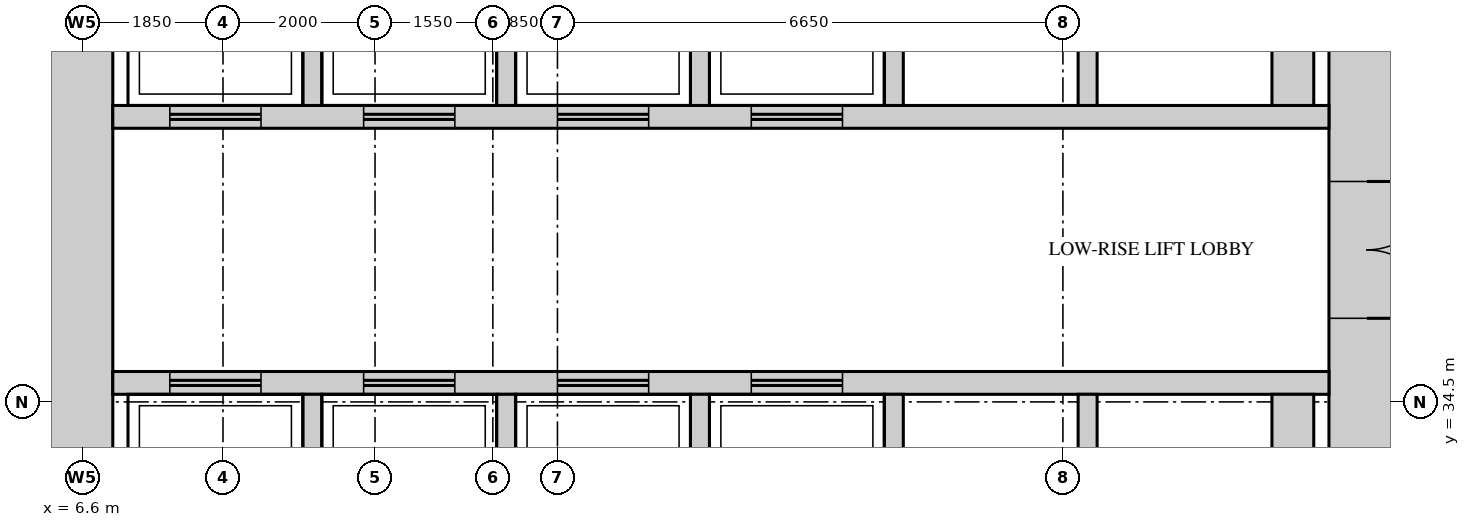
"""IFC4 building model, lengths in metres.
Left out: names, types, materials, properties, quantities, classifications, styles, units other than length and angle.
Written with IfcOpenShell. Run it as: python <this file> out.ifc"""

import sys

from ifc_helpers import new_model, si_unit, direction, frame, frame_2d, origin, place, context, subcontext, project, spatial, rectangle, extrude, source, transform, mapped, element, fill, save


model = new_model("IFC4")
c1 = context("Model", 3, precision=1e-05, world=origin(), true_north=direction((0.0, 1.0)))
c2 = subcontext(c1, "Body", "Model", "MODEL_VIEW")
j1 = project(units=[si_unit("LENGTHUNIT", "METRE"), si_unit("PLANEANGLEUNIT", "RADIAN")], contexts=[c1])
p1 = place(None, origin())
s1 = spatial("IfcSite", under=j1, at=p1, CompositionType="ELEMENT")
p2 = place(p1, origin())
s2 = spatial("IfcBuilding", under=s1, at=p2, CompositionType="ELEMENT")
p3 = place(p2, frame((0.0, 0.0, 136.7)))
s3 = spatial("IfcBuildingStorey", under=s2, at=p3, CompositionType="ELEMENT", Elevation=136.7)
m1 = source(origin(), c2, "Body", "SweptSolid", [
    extrude(rectangle(XDim=28.0, YDim=1.0, at=frame_2d((14.0, 0.0))), origin(), (0.0, 0.0, 1.0), 4.1),
])
p4 = place(p3, frame((23.5, 13.0, 0.0), z_axis=(0.0, 0.0, 1.0), x_axis=(0.0, 1.0, 0.0)))
e1 = element("IfcWall", 1, at=p4, inside=s3, PredefinedType="SHEAR", context=c2, shape_type="MappedRepresentation", body=[
    mapped(m1, transform((0.0, 0.0, 0.0))),
])
m2 = source(origin(), c2, "Body", "SweptSolid", [
    extrude(rectangle(XDim=1.8, YDim=2.1, at=frame_2d((0.9, 1.05))), frame((0.0, 0.51, 0.0), z_axis=(0.0, -1.0, 0.0), x_axis=(1.0, 0.0, 0.0)), (0.0, 0.0, 1.0), 1.02),
])
p5 = place(p4, frame((22.6, 0.0, 0.0)))
e2 = element("IfcOpeningElement", 2, at=p5, cuts=e1, PredefinedType="OPENING", context=c2, shape_type="MappedRepresentation", body=[
    mapped(m2, transform((0.0, 0.0, 0.0))),
])
m3 = source(origin(), c2, "Body", "SweptSolid", [
    extrude(rectangle(XDim=1.2, YDim=2.1, at=frame_2d((0.6, 1.05))), frame((0.0, 0.51, 0.0), z_axis=(0.0, -1.0, 0.0), x_axis=(1.0, 0.0, 0.0)), (0.0, 0.0, 1.0), 1.02),
])
p6 = place(p4, frame((15.35, 0.0, 0.0)))
e3 = element("IfcOpeningElement", 3, at=p6, cuts=e1, PredefinedType="OPENING", context=c2, shape_type="MappedRepresentation", body=[
    mapped(m3, transform((0.0, 0.0, 0.0))),
])
m4 = source(origin(), c2, "Body", "SweptSolid", [
    extrude(rectangle(XDim=0.9, YDim=2.1, at=frame_2d((0.45, 1.05))), frame((0.0, 0.51, 0.0), z_axis=(0.0, -1.0, 0.0), x_axis=(1.0, 0.0, 0.0)), (0.0, 0.0, 1.0), 1.02),
])
p7 = place(p4, frame((1.35, 0.0, 0.0)))
e4 = element("IfcOpeningElement", 4, at=p7, cuts=e1, PredefinedType="OPENING", context=c2, shape_type="MappedRepresentation", body=[
    mapped(m4, transform((0.0, 0.0, 0.0))),
])
p8 = place(p4, frame((4.55, 0.0, 0.0)))
e5 = element("IfcOpeningElement", 5, at=p8, cuts=e1, PredefinedType="OPENING", context=c2, shape_type="MappedRepresentation", body=[
    mapped(m4, transform((0.0, 0.0, 0.0))),
])
p9 = place(p4, frame((7.8, 0.0, 0.0)))
e6 = element("IfcOpeningElement", 6, at=p9, cuts=e1, PredefinedType="OPENING", context=c2, shape_type="MappedRepresentation", body=[
    mapped(m4, transform((0.0, 0.0, 0.0))),
])
p10 = place(p3, frame((6.5, 13.0, 0.0), z_axis=(0.0, 0.0, 1.0), x_axis=(0.0, 1.0, 0.0)))
e7 = element("IfcWall", 7, at=p10, inside=s3, PredefinedType="SHEAR", context=c2, shape_type="MappedRepresentation", body=[
    mapped(m1, transform((0.0, 0.0, 0.0))),
])
m5 = source(origin(), c2, "Body", "SweptSolid", [
    extrude(rectangle(XDim=16.0, YDim=0.3, at=frame_2d((8.0, 0.0))), origin(), (0.0, 0.0, 1.0), 4.1),
])
p11 = place(p3, frame((7.0, 38.25, 0.0), z_axis=(0.0, 0.0, 1.0), x_axis=(1.0, 0.0, 0.0)))
e8 = element("IfcWall", 8, at=p11, inside=s3, PredefinedType="STANDARD", context=c2, shape_type="MappedRepresentation", body=[
    mapped(m5, transform((0.0, 0.0, 0.0))),
])
m6 = source(origin(), c2, "Body", "SweptSolid", [
    extrude(rectangle(XDim=1.2, YDim=2.1, at=frame_2d((0.6, 1.05))), frame((0.0, 0.16, 0.0), z_axis=(0.0, -1.0, 0.0), x_axis=(1.0, 0.0, 0.0)), (0.0, 0.0, 1.0), 0.32),
])
p12 = place(p11, frame((0.75, 0.0, 0.0)))
e9 = element("IfcOpeningElement", 9, at=p12, cuts=e8, PredefinedType="OPENING", context=c2, shape_type="MappedRepresentation", body=[
    mapped(m6, transform((0.0, 0.0, 0.0))),
])
p13 = place(p11, frame((3.3, 0.0, 0.0)))
e10 = element("IfcOpeningElement", 10, at=p13, cuts=e8, PredefinedType="OPENING", context=c2, shape_type="MappedRepresentation", body=[
    mapped(m6, transform((0.0, 0.0, 0.0))),
])
p14 = place(p11, frame((5.85, 0.0, 0.0)))
e11 = element("IfcOpeningElement", 11, at=p14, cuts=e8, PredefinedType="OPENING", context=c2, shape_type="MappedRepresentation", body=[
    mapped(m6, transform((0.0, 0.0, 0.0))),
])
p15 = place(p11, frame((8.4, 0.0, 0.0)))
e12 = element("IfcOpeningElement", 12, at=p15, cuts=e8, PredefinedType="OPENING", context=c2, shape_type="MappedRepresentation", body=[
    mapped(m6, transform((0.0, 0.0, 0.0))),
])
p16 = place(p3, frame((7.0, 34.75, 0.0), z_axis=(0.0, 0.0, 1.0), x_axis=(1.0, 0.0, 0.0)))
e13 = element("IfcWall", 13, at=p16, inside=s3, PredefinedType="STANDARD", context=c2, shape_type="MappedRepresentation", body=[
    mapped(m5, transform((0.0, 0.0, 0.0))),
])
p17 = place(p16, frame((0.75, 0.0, 0.0)))
e14 = element("IfcOpeningElement", 14, at=p17, cuts=e13, PredefinedType="OPENING", context=c2, shape_type="MappedRepresentation", body=[
    mapped(m6, transform((0.0, 0.0, 0.0))),
])
p18 = place(p16, frame((3.3, 0.0, 0.0)))
e15 = element("IfcOpeningElement", 15, at=p18, cuts=e13, PredefinedType="OPENING", context=c2, shape_type="MappedRepresentation", body=[
    mapped(m6, transform((0.0, 0.0, 0.0))),
])
p19 = place(p16, frame((5.85, 0.0, 0.0)))
e16 = element("IfcOpeningElement", 16, at=p19, cuts=e13, PredefinedType="OPENING", context=c2, shape_type="MappedRepresentation", body=[
    mapped(m6, transform((0.0, 0.0, 0.0))),
])
p20 = place(p16, frame((8.4, 0.0, 0.0)))
e17 = element("IfcOpeningElement", 17, at=p20, cuts=e13, PredefinedType="OPENING", context=c2, shape_type="MappedRepresentation", body=[
    mapped(m6, transform((0.0, 0.0, 0.0))),
])
m7 = source(origin(), c2, "Body", "SweptSolid", [
    extrude(rectangle(XDim=2.6, YDim=0.25, at=frame_2d((1.3, 0.0))), origin(), (0.0, 0.0, 1.0), 4.1),
])
for number, where, z_axis, x_axis in (
    (18, (9.625, 38.4, 0.0), (0.0, 0.0, 1.0), (0.0, 1.0, 0.0)),
    (19, (12.175, 38.4, 0.0), (0.0, 0.0, 1.0), (0.0, 1.0, 0.0)),
    (20, (14.725, 38.4, 0.0), (0.0, 0.0, 1.0), (0.0, 1.0, 0.0)),
    (21, (17.275, 38.4, 0.0), (0.0, 0.0, 1.0), (0.0, 1.0, 0.0)),
    (22, (19.825, 38.4, 0.0), (0.0, 0.0, 1.0), (0.0, 1.0, 0.0)),
):
    element("IfcWall", number, at=place(p3, frame(where, z_axis=z_axis, x_axis=x_axis)), inside=s3, PredefinedType="STANDARD", context=c2, shape_type="MappedRepresentation", body=[
        mapped(m7, transform((0.0, 0.0, 0.0))),
    ])
m8 = source(origin(), c2, "Body", "SweptSolid", [
    extrude(rectangle(XDim=2.6, YDim=0.55, at=frame_2d((1.3, 0.0))), origin(), (0.0, 0.0, 1.0), 4.1),
])
p21 = place(p3, frame((22.525, 38.4, 0.0), z_axis=(0.0, 0.0, 1.0), x_axis=(0.0, 1.0, 0.0)))
e23 = element("IfcWall", 23, at=p21, inside=s3, PredefinedType="STANDARD", context=c2, shape_type="MappedRepresentation", body=[
    mapped(m8, transform((0.0, 0.0, 0.0))),
])
m9 = source(origin(), c2, "Body", "SweptSolid", [
    extrude(rectangle(XDim=2.4, YDim=0.25, at=frame_2d((1.2, 0.0))), origin(), (0.0, 0.0, 1.0), 4.1),
])
for number, where, z_axis, x_axis in (
    (24, (9.625, 32.2, 0.0), (0.0, 0.0, 1.0), (0.0, 1.0, 0.0)),
    (25, (12.175, 32.2, 0.0), (0.0, 0.0, 1.0), (0.0, 1.0, 0.0)),
    (26, (14.725, 32.2, 0.0), (0.0, 0.0, 1.0), (0.0, 1.0, 0.0)),
    (27, (17.275, 32.2, 0.0), (0.0, 0.0, 1.0), (0.0, 1.0, 0.0)),
    (28, (19.825, 32.2, 0.0), (0.0, 0.0, 1.0), (0.0, 1.0, 0.0)),
):
    element("IfcWall", number, at=place(p3, frame(where, z_axis=z_axis, x_axis=x_axis)), inside=s3, PredefinedType="STANDARD", context=c2, shape_type="MappedRepresentation", body=[
        mapped(m9, transform((0.0, 0.0, 0.0))),
    ])
m10 = source(origin(), c2, "Body", "SweptSolid", [
    extrude(rectangle(XDim=2.4, YDim=0.55, at=frame_2d((1.2, 0.0))), origin(), (0.0, 0.0, 1.0), 4.1),
])
p22 = place(p3, frame((22.525, 32.2, 0.0), z_axis=(0.0, 0.0, 1.0), x_axis=(0.0, 1.0, 0.0)))
e29 = element("IfcWall", 29, at=p22, inside=s3, PredefinedType="STANDARD", context=c2, shape_type="MappedRepresentation", body=[
    mapped(m10, transform((0.0, 0.0, 0.0))),
])
m11 = source(origin(), c2, "Body", "SweptSolid", [
    extrude(rectangle(XDim=1.8, YDim=2.1, at=frame_2d((0.9, 1.05))), frame((0.0, 0.45, 0.0), z_axis=(0.0, -1.0, 0.0), x_axis=(1.0, 0.0, 0.0)), (0.0, 0.0, 1.0), 0.9),
])
p23 = place(p5, origin())
e30 = element("IfcDoor", 30, at=p23, inside=s3, OperationType="DOUBLE_DOOR_SINGLE_SWING", PredefinedType="DOOR", context=c2, shape_type="MappedRepresentation", body=[
    mapped(m11, transform((0.0, 0.0, 0.0))),
])
fill(e2, e30)
m12 = source(origin(), c2, "Body", "SweptSolid", [
    extrude(rectangle(XDim=1.2, YDim=2.1, at=frame_2d((0.6, 1.05))), frame((0.0, 0.025, 0.0), z_axis=(0.0, -1.0, 0.0), x_axis=(1.0, 0.0, 0.0)), (0.0, 0.0, 1.0), 0.05),
])
p24 = place(p17, origin())
e31 = element("IfcDoor", 31, at=p24, inside=s3, OperationType="DOUBLE_DOOR_SLIDING", PredefinedType="DOOR", context=c2, shape_type="MappedRepresentation", body=[
    mapped(m12, transform((0.0, 0.0, 0.0))),
])
fill(e14, e31)
p25 = place(p18, origin())
e32 = element("IfcDoor", 32, at=p25, inside=s3, OperationType="DOUBLE_DOOR_SLIDING", PredefinedType="DOOR", context=c2, shape_type="MappedRepresentation", body=[
    mapped(m12, transform((0.0, 0.0, 0.0))),
])
fill(e15, e32)
p26 = place(p19, origin())
e33 = element("IfcDoor", 33, at=p26, inside=s3, OperationType="DOUBLE_DOOR_SLIDING", PredefinedType="DOOR", context=c2, shape_type="MappedRepresentation", body=[
    mapped(m12, transform((0.0, 0.0, 0.0))),
])
fill(e16, e33)
p27 = place(p20, origin())
e34 = element("IfcDoor", 34, at=p27, inside=s3, OperationType="DOUBLE_DOOR_SLIDING", PredefinedType="DOOR", context=c2, shape_type="MappedRepresentation", body=[
    mapped(m12, transform((0.0, 0.0, 0.0))),
])
fill(e17, e34)
p28 = place(p12, origin())
e35 = element("IfcDoor", 35, at=p28, inside=s3, OperationType="DOUBLE_DOOR_SLIDING", PredefinedType="DOOR", context=c2, shape_type="MappedRepresentation", body=[
    mapped(m12, transform((0.0, 0.0, 0.0))),
])
fill(e9, e35)
p29 = place(p13, origin())
e36 = element("IfcDoor", 36, at=p29, inside=s3, OperationType="DOUBLE_DOOR_SLIDING", PredefinedType="DOOR", context=c2, shape_type="MappedRepresentation", body=[
    mapped(m12, transform((0.0, 0.0, 0.0))),
])
fill(e10, e36)
p30 = place(p14, origin())
e37 = element("IfcDoor", 37, at=p30, inside=s3, OperationType="DOUBLE_DOOR_SLIDING", PredefinedType="DOOR", context=c2, shape_type="MappedRepresentation", body=[
    mapped(m12, transform((0.0, 0.0, 0.0))),
])
fill(e11, e37)
p31 = place(p15, origin())
e38 = element("IfcDoor", 38, at=p31, inside=s3, OperationType="DOUBLE_DOOR_SLIDING", PredefinedType="DOOR", context=c2, shape_type="MappedRepresentation", body=[
    mapped(m12, transform((0.0, 0.0, 0.0))),
])
fill(e12, e38)
save(model, sys.argv[1])
